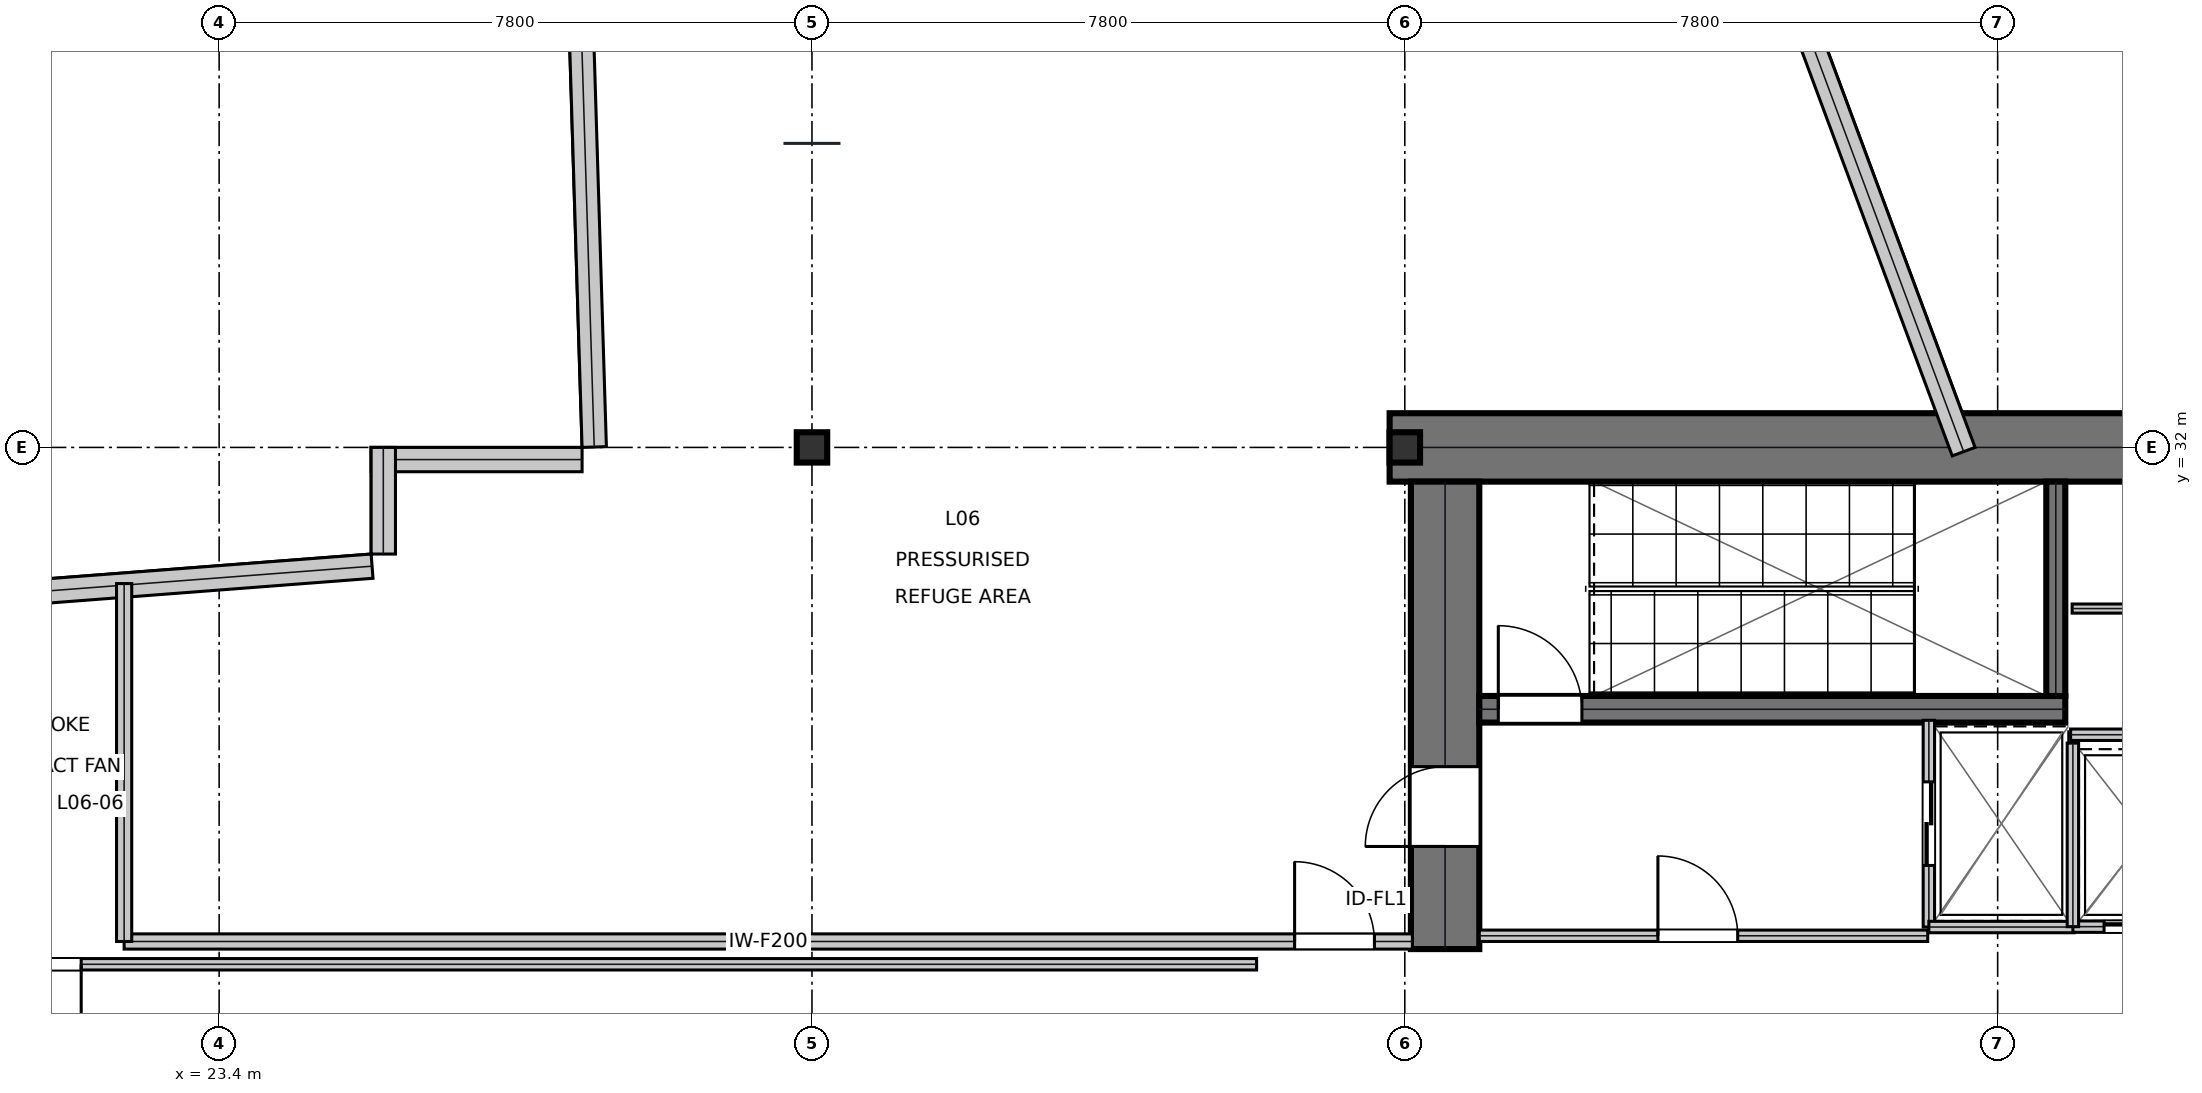
"""IFC4 building model, lengths in metres.
Left out: names, types, materials, properties, quantities, classifications, styles, units other than length and angle.
Written with IfcOpenShell. Run it as: python <this file> out.ifc"""

import sys

from ifc_helpers import new_model, si_unit, direction, frame, frame_2d, origin, origin_2d, place, context, subcontext, project, spatial, rectangle, i_section, extrude, element, fill, save


model = new_model("IFC4")
c1 = context("Model", 3, precision=1e-05, world=origin(), true_north=direction((0.0, 1.0)))
c2 = subcontext(c1, "Body", "Model", "MODEL_VIEW")
j1 = project(units=[si_unit("LENGTHUNIT", "METRE"), si_unit("PLANEANGLEUNIT", "RADIAN")], contexts=[c1])
p1 = place(None, origin())
s1 = spatial("IfcSite", under=j1, at=p1, CompositionType="ELEMENT")
p2 = place(p1, origin())
s2 = spatial("IfcBuilding", under=s1, at=p2, CompositionType="ELEMENT")
p3 = place(p2, frame((0.0, 0.0, 32.4)))
s3 = spatial("IfcBuildingStorey", under=s2, at=p3, CompositionType="ELEMENT", Elevation=32.4)
p4 = place(p3, frame((38.8, 32.0, 0.0), z_axis=(0.0, 0.0, 1.0), x_axis=(1.0, 0.0, 0.0)))
e1 = element("IfcWall", 1, at=p4, inside=s3, PredefinedType="SHEAR", context=c2, shape_type="SweptSolid", body=[
    extrude(rectangle(XDim=16.0, YDim=0.9, at=frame_2d((8.0, 0.0))), origin(), (0.0, 0.0, 1.0), 5.16),
])
p5 = place(p3, frame((39.53, 25.4, 0.0), z_axis=(0.0, 0.0, 1.0), x_axis=(0.0, 1.0, 0.0)))
e2 = element("IfcWall", 2, at=p5, inside=s3, PredefinedType="SHEAR", context=c2, shape_type="SweptSolid", body=[
    extrude(rectangle(XDim=6.15, YDim=0.9, at=frame_2d((3.075, 0.0))), origin(), (0.0, 0.0, 1.0), 5.16),
])
p6 = place(p5, frame((1.35, 0.0, 0.0)))
e3 = element("IfcOpeningElement", 3, at=p6, cuts=e2, PredefinedType="OPENING", context=c2, shape_type="SweptSolid", body=[
    extrude(rectangle(XDim=1.05, YDim=2.15, at=frame_2d((0.525, 1.075))), frame((0.0, 0.46, 0.0), z_axis=(0.0, -1.0, 0.0), x_axis=(1.0, 0.0, 0.0)), (0.0, 0.0, 1.0), 0.92),
])
p7 = place(p3, frame((39.98, 28.555, 0.0), z_axis=(0.0, 0.0, 1.0), x_axis=(1.0, 0.0, 0.0)))
e4 = element("IfcWall", 4, at=p7, inside=s3, PredefinedType="SHEAR", context=c2, shape_type="SweptSolid", body=[
    extrude(rectangle(XDim=7.71, YDim=0.35, at=frame_2d((3.855, 0.0))), origin(), (0.0, 0.0, 1.0), 5.16),
])
p8 = place(p7, frame((0.25, 0.0, 0.0)))
e5 = element("IfcOpeningElement", 5, at=p8, cuts=e4, PredefinedType="OPENING", context=c2, shape_type="SweptSolid", body=[
    extrude(rectangle(XDim=1.1, YDim=2.15, at=frame_2d((0.55, 1.075))), frame((0.0, 0.185, 0.0), z_axis=(0.0, -1.0, 0.0), x_axis=(1.0, 0.0, 0.0)), (0.0, 0.0, 1.0), 0.37),
])
p9 = place(p3, frame((47.565, 28.73, 0.0), z_axis=(0.0, 0.0, 1.0), x_axis=(0.0, 1.0, 0.0)))
e6 = element("IfcWall", 6, at=p9, inside=s3, PredefinedType="SHEAR", context=c2, shape_type="SweptSolid", body=[
    extrude(rectangle(XDim=2.82, YDim=0.25, at=frame_2d((1.41, 0.0))), origin(), (0.0, 0.0, 1.0), 5.16),
])
for number, where, z_axis, x_axis in (
    (7, (31.2, 32.0, 0.0), (0.0, 0.0, 1.0), (1.0, 0.0, 0.0)),
    (8, (39.0, 32.0, 0.0), (0.0, 0.0, 1.0), (1.0, 0.0, 0.0)),
):
    element("IfcColumn", number, at=place(p3, frame(where, z_axis=z_axis, x_axis=x_axis)), inside=s3, PredefinedType="COLUMN", context=c2, shape_type="SweptSolid", body=[
        extrude(i_section(OverallWidth=0.401, OverallDepth=0.399, WebThickness=0.025, FlangeThickness=0.04, at=origin_2d()), origin(), (0.0, 0.0, 1.0), 5.394),
    ])
p10 = place(p3, frame((46.353, 31.944, 0.0), z_axis=(0.0, 0.0, 1.0), x_axis=(-0.34837713867, 0.937354452303, 0.0)))
e9 = element("IfcWall", 9, at=p10, inside=s3, PredefinedType="STANDARD", context=c2, shape_type="SweptSolid", body=[
    extrude(rectangle(XDim=13.442, YDim=0.32, at=frame_2d((6.721, 0.0))), origin(), (0.0, 0.0, 1.0), 4.688),
])
p11 = place(p3, frame((27.94, 44.805, 0.0), z_axis=(0.0, 0.0, 1.0), x_axis=(0.030865144105, -0.999523557941, 0.0)))
e10 = element("IfcWall", 10, at=p11, inside=s3, PredefinedType="STANDARD", context=c2, shape_type="SweptSolid", body=[
    extrude(rectangle(XDim=12.806, YDim=0.32, at=frame_2d((6.403, 0.0))), origin(), (0.0, 0.0, 1.0), 5.16),
])
p12 = place(p3, frame((28.175, 31.84, 0.0), z_axis=(0.0, 0.0, 1.0), x_axis=(-1.0, 0.0, 0.0)))
e11 = element("IfcWall", 11, at=p12, inside=s3, PredefinedType="STANDARD", context=c2, shape_type="SweptSolid", body=[
    extrude(rectangle(XDim=2.775, YDim=0.32, at=frame_2d((1.388, 0.0))), origin(), (0.0, 0.0, 1.0), 5.16),
])
p13 = place(p3, frame((25.56, 32.0, 0.0), z_axis=(0.0, 0.0, 1.0), x_axis=(0.0, -1.0, 0.0)))
e12 = element("IfcWall", 12, at=p13, inside=s3, PredefinedType="STANDARD", context=c2, shape_type="SweptSolid", body=[
    extrude(rectangle(XDim=1.403, YDim=0.32, at=frame_2d((0.701, 0.0))), origin(), (0.0, 0.0, 1.0), 4.688),
])
p14 = place(p3, frame((25.412, 30.438, 0.0), z_axis=(0.0, 0.0, 1.0), x_axis=(-0.997092621347, -0.076199110592, 0.0)))
e13 = element("IfcWall", 13, at=p14, inside=s3, PredefinedType="STANDARD", context=c2, shape_type="SweptSolid", body=[
    extrude(rectangle(XDim=19.256, YDim=0.32, at=frame_2d((9.628, 0.0))), origin(), (0.0, 0.0, 1.0), 4.688),
])
p15 = place(p3, frame((39.98, 25.575, 0.0), z_axis=(0.0, 0.0, 1.0), x_axis=(1.0, 0.0, 0.0)))
e14 = element("IfcWall", 14, at=p15, inside=s3, PredefinedType="PARTITIONING", context=c2, shape_type="SweptSolid", body=[
    extrude(rectangle(XDim=5.9, YDim=0.15, at=frame_2d((2.95, 0.0))), origin(), (0.0, 0.0, 1.0), 5.16),
])
p16 = place(p15, frame((2.35, 0.0, 0.0)))
e15 = element("IfcOpeningElement", 15, at=p16, cuts=e14, PredefinedType="OPENING", context=c2, shape_type="SweptSolid", body=[
    extrude(rectangle(XDim=1.05, YDim=2.15, at=frame_2d((0.525, 1.075))), frame((0.0, 0.085, 0.0), z_axis=(0.0, -1.0, 0.0), x_axis=(1.0, 0.0, 0.0)), (0.0, 0.0, 1.0), 0.17),
])
p17 = place(p3, frame((45.895, 25.69, 0.0), z_axis=(0.0, 0.0, 1.0), x_axis=(0.0, 1.0, 0.0)))
e16 = element("IfcWall", 16, at=p17, inside=s3, PredefinedType="PARTITIONING", context=c2, shape_type="SweptSolid", body=[
    extrude(rectangle(XDim=2.72, YDim=0.15, at=frame_2d((1.36, 0.0))), origin(), (0.0, 0.0, 1.0), 5.16),
])
p18 = place(p17, frame((0.81, 0.0, 0.0)))
e17 = element("IfcOpeningElement", 17, at=p18, cuts=e16, PredefinedType="OPENING", context=c2, shape_type="SweptSolid", body=[
    extrude(rectangle(XDim=1.1, YDim=2.15, at=frame_2d((0.55, 1.075))), frame((0.0, 0.085, 0.0), z_axis=(0.0, -1.0, 0.0), x_axis=(1.0, 0.0, 0.0)), (0.0, 0.0, 1.0), 0.17),
])
p19 = place(p3, frame((45.895, 25.69, 0.0), z_axis=(0.0, 0.0, 1.0), x_axis=(1.0, 0.0, 0.0)))
e18 = element("IfcWall", 18, at=p19, inside=s3, PredefinedType="PARTITIONING", context=c2, shape_type="SweptSolid", body=[
    extrude(rectangle(XDim=1.915, YDim=0.15, at=frame_2d((0.958, 0.0))), origin(), (0.0, 0.0, 1.0), 5.16),
])
p20 = place(p3, frame((47.79, 25.695, 0.0), z_axis=(0.0, 0.0, 1.0), x_axis=(1.0, 0.0, 0.0)))
e19 = element("IfcWall", 19, at=p20, inside=s3, PredefinedType="PARTITIONING", context=c2, shape_type="SweptSolid", body=[
    extrude(rectangle(XDim=1.92, YDim=0.15, at=frame_2d((0.96, 0.0))), origin(), (0.0, 0.0, 1.0), 5.16),
])
p21 = place(p20, frame((0.41, 0.0, 0.0)))
e20 = element("IfcOpeningElement", 20, at=p21, cuts=e19, PredefinedType="OPENING", context=c2, shape_type="SweptSolid", body=[
    extrude(rectangle(XDim=1.1, YDim=2.15, at=frame_2d((0.55, 1.075))), frame((0.0, 0.085, 0.0), z_axis=(0.0, -1.0, 0.0), x_axis=(1.0, 0.0, 0.0)), (0.0, 0.0, 1.0), 0.17),
])
p22 = place(p3, frame((47.79, 25.695, 0.0), z_axis=(0.0, 0.0, 1.0), x_axis=(0.0, 1.0, 0.0)))
e21 = element("IfcWall", 21, at=p22, inside=s3, PredefinedType="PARTITIONING", context=c2, shape_type="SweptSolid", body=[
    extrude(rectangle(XDim=2.415, YDim=0.15, at=frame_2d((1.208, 0.0))), origin(), (0.0, 0.0, 1.0), 5.16),
])
p23 = place(p3, frame((47.76, 28.22, 0.0), z_axis=(0.0, 0.0, 1.0), x_axis=(1.0, 0.0, 0.0)))
e22 = element("IfcWall", 22, at=p23, inside=s3, PredefinedType="PARTITIONING", context=c2, shape_type="SweptSolid", body=[
    extrude(rectangle(XDim=1.96, YDim=0.15, at=frame_2d((0.98, 0.0))), origin(), (0.0, 0.0, 1.0), 5.16),
])
p24 = place(p3, frame((47.78, 29.88, 0.0), z_axis=(0.0, 0.0, 1.0), x_axis=(1.0, 0.0, 0.0)))
e23 = element("IfcWall", 23, at=p24, inside=s3, PredefinedType="PARTITIONING", context=c2, shape_type="SweptSolid", body=[
    extrude(rectangle(XDim=1.92, YDim=0.12, at=frame_2d((0.96, 0.0))), origin(), (0.0, 0.0, 1.0), 5.16),
])
p25 = place(p3, frame((22.15, 25.5, 0.0), z_axis=(0.0, 0.0, 1.0), x_axis=(1.0, 0.0, 0.0)))
e24 = element("IfcWall", 24, at=p25, inside=s3, PredefinedType="SOLIDWALL", context=c2, shape_type="SweptSolid", body=[
    extrude(rectangle(XDim=16.95, YDim=0.2, at=frame_2d((8.475, 0.0))), origin(), (0.0, 0.0, 1.0), 4.531),
])
p26 = place(p25, frame((15.4, 0.0, 0.0)))
e25 = element("IfcOpeningElement", 25, at=p26, cuts=e24, PredefinedType="OPENING", context=c2, shape_type="SweptSolid", body=[
    extrude(rectangle(XDim=1.05, YDim=2.15, at=frame_2d((0.525, 1.075))), frame((0.0, 0.11, 0.0), z_axis=(0.0, -1.0, 0.0), x_axis=(1.0, 0.0, 0.0)), (0.0, 0.0, 1.0), 0.22),
])
p27 = place(p3, frame((22.15, 25.5, 0.0), z_axis=(0.0, 0.0, 1.0), x_axis=(0.0, 1.0, 0.0)))
e26 = element("IfcWall", 26, at=p27, inside=s3, PredefinedType="SOLIDWALL", context=c2, shape_type="SweptSolid", body=[
    extrude(rectangle(XDim=4.709, YDim=0.2, at=frame_2d((2.354, 0.0))), origin(), (0.0, 0.0, 1.0), 4.688),
])
p28 = place(p3, frame((20.39, 25.2, 0.0), z_axis=(0.0, 0.0, 1.0), x_axis=(1.0, 0.0, 0.0)))
e27 = element("IfcWall", 27, at=p28, inside=s3, PredefinedType="PARTITIONING", context=c2, shape_type="SweptSolid", body=[
    extrude(rectangle(XDim=16.66, YDim=0.15, at=frame_2d((8.33, 0.0))), origin(), (0.0, 0.0, 1.0), 4.531),
])
p29 = place(p28, frame((0.345, 0.0, 0.0)))
e28 = element("IfcOpeningElement", 28, at=p29, cuts=e27, PredefinedType="OPENING", context=c2, shape_type="SweptSolid", body=[
    extrude(rectangle(XDim=0.85, YDim=2.15, at=frame_2d((0.425, 1.075))), frame((0.0, 0.085, 0.0), z_axis=(0.0, -1.0, 0.0), x_axis=(1.0, 0.0, 0.0)), (0.0, 0.0, 1.0), 0.17),
])
p30 = place(p16, origin())
e29 = element("IfcDoor", 29, at=p30, inside=s3, OperationType="SINGLE_SWING_LEFT", PredefinedType="DOOR", context=c2, shape_type="SweptSolid", body=[
    extrude(rectangle(XDim=1.05, YDim=2.15, at=frame_2d((0.525, 1.075))), frame((0.0, 0.025, 0.0), z_axis=(0.0, -1.0, 0.0), x_axis=(1.0, 0.0, 0.0)), (0.0, 0.0, 1.0), 0.05),
])
fill(e15, e29)
p31 = place(p18, frame((1.1, 0.0, 0.0), z_axis=(0.0, 0.0, 1.0), x_axis=(-1.0, 0.0, 0.0)))
e30 = element("IfcDoor", 30, at=p31, inside=s3, OperationType="DOUBLE_DOOR_SLIDING", PredefinedType="DOOR", context=c2, shape_type="SweptSolid", body=[
    extrude(rectangle(XDim=1.1, YDim=2.15, at=frame_2d((0.55, 1.075))), frame((0.0, 0.025, 0.0), z_axis=(0.0, -1.0, 0.0), x_axis=(1.0, 0.0, 0.0)), (0.0, 0.0, 1.0), 0.05),
])
fill(e17, e30)
p32 = place(p21, frame((1.1, 0.0, 0.0), z_axis=(0.0, 0.0, 1.0), x_axis=(-1.0, 0.0, 0.0)))
e31 = element("IfcDoor", 31, at=p32, inside=s3, OperationType="DOUBLE_DOOR_SLIDING", PredefinedType="DOOR", context=c2, shape_type="SweptSolid", body=[
    extrude(rectangle(XDim=1.1, YDim=2.15, at=frame_2d((0.55, 1.075))), frame((0.0, 0.025, 0.0), z_axis=(0.0, -1.0, 0.0), x_axis=(1.0, 0.0, 0.0)), (0.0, 0.0, 1.0), 0.05),
])
fill(e20, e31)
p33 = place(p26, origin())
e32 = element("IfcDoor", 32, at=p33, inside=s3, OperationType="SINGLE_SWING_LEFT", PredefinedType="DOOR", context=c2, shape_type="SweptSolid", body=[
    extrude(rectangle(XDim=1.05, YDim=2.15, at=frame_2d((0.525, 1.075))), frame((0.0, 0.025, 0.0), z_axis=(0.0, -1.0, 0.0), x_axis=(1.0, 0.0, 0.0)), (0.0, 0.0, 1.0), 0.05),
])
fill(e25, e32)
p34 = place(p29, frame((0.85, 0.0, 0.0), z_axis=(0.0, 0.0, 1.0), x_axis=(-1.0, 0.0, 0.0)))
e33 = element("IfcDoor", 33, at=p34, inside=s3, OperationType="SINGLE_SWING_LEFT", PredefinedType="DOOR", context=c2, shape_type="SweptSolid", body=[
    extrude(rectangle(XDim=0.85, YDim=2.15, at=frame_2d((0.425, 1.075))), frame((0.0, 0.025, 0.0), z_axis=(0.0, -1.0, 0.0), x_axis=(1.0, 0.0, 0.0)), (0.0, 0.0, 1.0), 0.05),
])
fill(e28, e33)
p35 = place(p8, origin())
e34 = element("IfcDoor", 34, at=p35, inside=s3, OperationType="SINGLE_SWING_LEFT", PredefinedType="DOOR", context=c2, shape_type="SweptSolid", body=[
    extrude(rectangle(XDim=1.1, YDim=2.15, at=frame_2d((0.55, 1.075))), frame((0.0, 0.025, 0.0), z_axis=(0.0, -1.0, 0.0), x_axis=(1.0, 0.0, 0.0)), (0.0, 0.0, 1.0), 0.05),
])
fill(e5, e34)
p36 = place(p6, origin())
e35 = element("IfcDoor", 35, at=p36, inside=s3, OperationType="SINGLE_SWING_LEFT", PredefinedType="DOOR", context=c2, shape_type="SweptSolid", body=[
    extrude(rectangle(XDim=1.05, YDim=2.15, at=frame_2d((0.525, 1.075))), frame((0.0, 0.025, 0.0), z_axis=(0.0, -1.0, 0.0), x_axis=(1.0, 0.0, 0.0)), (0.0, 0.0, 1.0), 0.05),
])
fill(e3, e35)
save(model, sys.argv[1])
